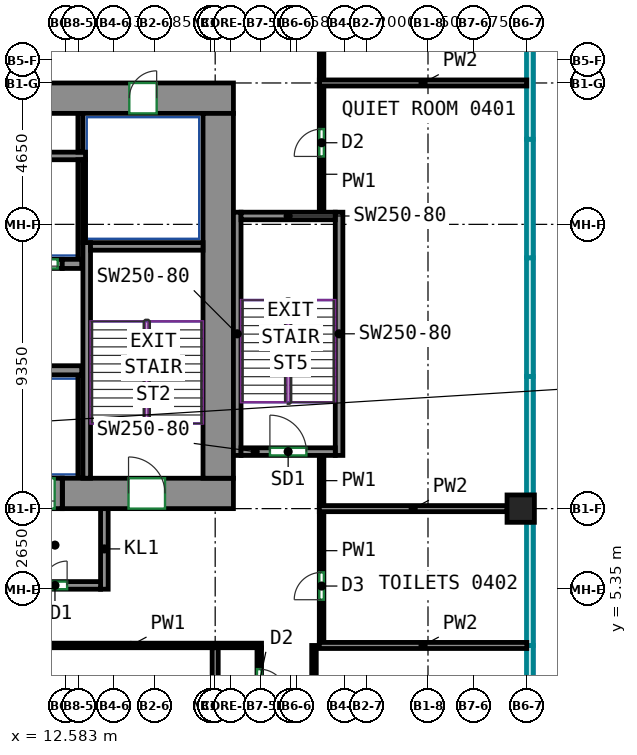
"""IFC4 building model, lengths in metres.
Left out: names, types, materials, properties, quantities, classifications, styles, units other than length and angle.
Written with IfcOpenShell. Run it as: python <this file> out.ifc"""

import sys

from ifc_helpers import new_model, si_unit, direction, frame, frame_2d, origin, origin_2d, place, context, subcontext, project, spatial, rectangle, extrude, source, transform, mapped, element, fill, save


model = new_model("IFC4")
c1 = context("Model", 3, precision=1e-05, world=origin(), true_north=direction((0.0, 1.0)))
c2 = subcontext(c1, "Body", "Model", "MODEL_VIEW")
j1 = project(units=[si_unit("LENGTHUNIT", "METRE"), si_unit("PLANEANGLEUNIT", "RADIAN")], contexts=[c1])
p1 = place(None, origin())
s1 = spatial("IfcSite", under=j1, at=p1, CompositionType="ELEMENT")
p2 = place(p1, origin())
s2 = spatial("IfcBuilding", under=s1, at=p2, CompositionType="ELEMENT")
p3 = place(p2, frame((0.0, 0.0, 22.5)))
s3 = spatial("IfcBuildingStorey", under=s2, at=p3, CompositionType="ELEMENT", Elevation=22.5)
m1 = source(origin(), c2, "Body", "SweptSolid", [
    extrude(rectangle(XDim=0.9, YDim=0.9, at=origin_2d()), origin(), (0.0, 0.0, 1.0), 4.22),
])
p4 = place(p3, frame((27.55, 8.0, 0.0), z_axis=(0.0, 0.0, 1.0), x_axis=(1.0, 0.0, 0.0)))
e1 = element("IfcColumn", 1, at=p4, inside=s3, PredefinedType="COLUMN", context=c2, shape_type="MappedRepresentation", body=[
    mapped(m1, transform((0.0, 0.0, 0.0))),
])
m2 = source(origin(), c2, "Body", "SweptSolid", [
    extrude(rectangle(XDim=5.63, YDim=1.0, at=frame_2d((2.815, 0.0))), origin(), (0.0, 0.0, 1.0), 4.22),
])
p5 = place(p3, frame((12.47, 8.5, 0.0), z_axis=(0.0, 0.0, 1.0), x_axis=(1.0, 0.0, 0.0)))
e2 = element("IfcWall", 2, at=p5, inside=s3, PredefinedType="SHEAR", context=c2, shape_type="MappedRepresentation", body=[
    mapped(m2, transform((0.0, 0.0, 0.0))),
])
p6 = place(p5, frame((2.18, 0.0, 0.0)))
e3 = element("IfcOpeningElement", 3, at=p6, cuts=e2, PredefinedType="OPENING", context=c2, shape_type="SweptSolid", body=[
    extrude(rectangle(XDim=1.2, YDim=2.1, at=frame_2d((0.6, 1.05))), frame((0.0, 0.51, 0.0), z_axis=(0.0, -1.0, 0.0), x_axis=(1.0, 0.0, 0.0)), (0.0, 0.0, 1.0), 1.02),
])
m3 = source(origin(), c2, "Body", "SweptSolid", [
    extrude(rectangle(XDim=34.1, YDim=1.0, at=frame_2d((17.05, 0.0))), origin(), (0.0, 0.0, 1.0), 4.22),
])
p7 = place(p3, frame((-16.0, 21.5, 0.0), z_axis=(0.0, 0.0, 1.0), x_axis=(1.0, 0.0, 0.0)))
e4 = element("IfcWall", 4, at=p7, inside=s3, PredefinedType="SHEAR", context=c2, shape_type="MappedRepresentation", body=[
    mapped(m3, transform((0.0, 0.0, 0.0))),
])
p8 = place(p7, frame((6.831, 0.0, 0.0)))
e5 = element("IfcOpeningElement", 5, at=p8, cuts=e4, PredefinedType="OPENING", context=c2, shape_type="SweptSolid", body=[
    extrude(rectangle(XDim=0.9, YDim=2.1, at=frame_2d((0.45, 1.05))), frame((0.0, 0.51, 0.0), z_axis=(0.0, -1.0, 0.0), x_axis=(1.0, 0.0, 0.0)), (0.0, 0.0, 1.0), 1.02),
])
p9 = place(p7, frame((12.138, 0.0, 0.0)))
e6 = element("IfcOpeningElement", 6, at=p9, cuts=e4, PredefinedType="OPENING", context=c2, shape_type="SweptSolid", body=[
    extrude(rectangle(XDim=0.9, YDim=2.1, at=frame_2d((0.45, 1.05))), frame((0.0, 0.51, 0.0), z_axis=(0.0, -1.0, 0.0), x_axis=(1.0, 0.0, 0.0)), (0.0, 0.0, 1.0), 1.02),
])
p10 = place(p7, frame((17.565, 0.0, 0.0)))
e7 = element("IfcOpeningElement", 7, at=p10, cuts=e4, PredefinedType="OPENING", context=c2, shape_type="SweptSolid", body=[
    extrude(rectangle(XDim=0.9, YDim=2.1, at=frame_2d((0.45, 1.05))), frame((0.0, 0.51, 0.0), z_axis=(0.0, -1.0, 0.0), x_axis=(1.0, 0.0, 0.0)), (0.0, 0.0, 1.0), 1.02),
])
p11 = place(p7, frame((21.786, 0.0, 0.0)))
e8 = element("IfcOpeningElement", 8, at=p11, cuts=e4, PredefinedType="OPENING", context=c2, shape_type="SweptSolid", body=[
    extrude(rectangle(XDim=0.9, YDim=2.1, at=frame_2d((0.45, 1.05))), frame((0.0, 0.51, 0.0), z_axis=(0.0, -1.0, 0.0), x_axis=(1.0, 0.0, 0.0)), (0.0, 0.0, 1.0), 1.02),
])
p12 = place(p7, frame((26.127, 0.0, 0.0)))
e9 = element("IfcOpeningElement", 9, at=p12, cuts=e4, PredefinedType="OPENING", context=c2, shape_type="SweptSolid", body=[
    extrude(rectangle(XDim=0.9, YDim=2.1, at=frame_2d((0.45, 1.05))), frame((0.0, 0.51, 0.0), z_axis=(0.0, -1.0, 0.0), x_axis=(1.0, 0.0, 0.0)), (0.0, 0.0, 1.0), 1.02),
])
p13 = place(p7, frame((2.525, 0.0, 0.0)))
e10 = element("IfcOpeningElement", 10, at=p13, cuts=e4, PredefinedType="OPENING", context=c2, shape_type="SweptSolid", body=[
    extrude(rectangle(XDim=0.9, YDim=2.1, at=frame_2d((0.45, 1.05))), frame((0.0, 0.51, 0.0), z_axis=(0.0, -1.0, 0.0), x_axis=(1.0, 0.0, 0.0)), (0.0, 0.0, 1.0), 1.02),
])
p14 = place(p7, frame((30.675, 0.0, 0.0)))
e11 = element("IfcOpeningElement", 11, at=p14, cuts=e4, PredefinedType="OPENING", context=c2, shape_type="SweptSolid", body=[
    extrude(rectangle(XDim=0.9, YDim=2.1, at=frame_2d((0.45, 1.05))), frame((0.0, 0.51, 0.0), z_axis=(0.0, -1.0, 0.0), x_axis=(1.0, 0.0, 0.0)), (0.0, 0.0, 1.0), 1.02),
])
m4 = source(origin(), c2, "Body", "SweptSolid", [
    extrude(rectangle(XDim=12.0, YDim=1.0, at=frame_2d((6.0, 0.0))), origin(), (0.0, 0.0, 1.0), 4.22),
])
p15 = place(p3, frame((17.6, 9.0, 0.0), z_axis=(0.0, 0.0, 1.0), x_axis=(0.0, 1.0, 0.0)))
e12 = element("IfcWall", 12, at=p15, inside=s3, PredefinedType="SHEAR", context=c2, shape_type="MappedRepresentation", body=[
    mapped(m4, transform((0.0, 0.0, 0.0))),
])
m5 = source(origin(), c2, "Body", "SweptSolid", [
    extrude(rectangle(XDim=7.75, YDim=0.25, at=frame_2d((3.875, 0.0))), origin(), (0.0, 0.0, 1.0), 4.22),
])
p16 = place(p3, frame((13.275, 9.0, 0.0), z_axis=(0.0, 0.0, 1.0), x_axis=(0.0, 1.0, 0.0)))
e13 = element("IfcWall", 13, at=p16, inside=s3, PredefinedType="SHEAR", context=c2, shape_type="MappedRepresentation", body=[
    mapped(m5, transform((0.0, 0.0, 0.0))),
])
m6 = source(origin(), c2, "Body", "SweptSolid", [
    extrude(rectangle(XDim=3.7, YDim=0.25, at=frame_2d((1.85, 0.0))), origin(), (0.0, 0.0, 1.0), 4.22),
])
p17 = place(p3, frame((13.4, 16.625, 0.0), z_axis=(0.0, 0.0, 1.0), x_axis=(1.0, 0.0, 0.0)))
e14 = element("IfcWall", 14, at=p17, inside=s3, PredefinedType="SHEAR", context=c2, shape_type="MappedRepresentation", body=[
    mapped(m6, transform((0.0, 0.0, 0.0))),
])
m7 = source(origin(), c2, "Body", "SweptSolid", [
    extrude(rectangle(XDim=8.0, YDim=0.25, at=frame_2d((4.0, 0.0))), origin(), (0.0, 0.0, 1.0), 4.22),
])
for number, where, z_axis, x_axis in (
    (15, (18.225, 9.75, 0.0), (0.0, 0.0, 1.0), (0.0, 1.0, 0.0)),
    (16, (21.575, 9.75, 0.0), (0.0, 0.0, 1.0), (0.0, 1.0, 0.0)),
):
    element("IfcWall", number, at=place(p3, frame(where, z_axis=z_axis, x_axis=x_axis)), inside=s3, PredefinedType="SHEAR", context=c2, shape_type="MappedRepresentation", body=[
        mapped(m7, transform((0.0, 0.0, 0.0))),
    ])
m8 = source(origin(), c2, "Body", "SweptSolid", [
    extrude(rectangle(XDim=3.1, YDim=0.25, at=frame_2d((1.55, 0.0))), origin(), (0.0, 0.0, 1.0), 4.22),
])
p18 = place(p3, frame((18.35, 9.875, 0.0), z_axis=(0.0, 0.0, 1.0), x_axis=(1.0, 0.0, 0.0)))
e17 = element("IfcWall", 17, at=p18, inside=s3, PredefinedType="SHEAR", context=c2, shape_type="MappedRepresentation", body=[
    mapped(m8, transform((0.0, 0.0, 0.0))),
])
p19 = place(p18, frame((0.95, 0.0, 0.0)))
e18 = element("IfcOpeningElement", 18, at=p19, cuts=e17, PredefinedType="OPENING", context=c2, shape_type="SweptSolid", body=[
    extrude(rectangle(XDim=1.2, YDim=2.1, at=frame_2d((0.6, 1.05))), frame((0.0, 0.135, 0.0), z_axis=(0.0, -1.0, 0.0), x_axis=(1.0, 0.0, 0.0)), (0.0, 0.0, 1.0), 0.27),
])
p20 = place(p3, frame((18.35, 17.625, 0.0), z_axis=(0.0, 0.0, 1.0), x_axis=(1.0, 0.0, 0.0)))
e19 = element("IfcWall", 19, at=p20, inside=s3, PredefinedType="SHEAR", context=c2, shape_type="MappedRepresentation", body=[
    mapped(m8, transform((0.0, 0.0, 0.0))),
])
m9 = source(origin(), c2, "Body", "SweptSolid", [
    extrude(rectangle(XDim=2.82, YDim=0.3, at=frame_2d((1.41, 0.0))), origin(), (0.0, 0.0, 1.0), 4.22),
])
p21 = place(p3, frame((10.29, 12.55, 0.0), z_axis=(0.0, 0.0, 1.0), x_axis=(1.0, 0.0, 0.0)))
e20 = element("IfcWall", 20, at=p21, inside=s3, PredefinedType="SHEAR", context=c2, shape_type="MappedRepresentation", body=[
    mapped(m9, transform((0.0, 0.0, 0.0))),
])
m10 = source(origin(), c2, "Body", "SweptSolid", [
    extrude(rectangle(XDim=0.64, YDim=0.3, at=frame_2d((0.32, 0.0))), origin(), (0.0, 0.0, 1.0), 4.22),
])
p22 = place(p3, frame((12.47, 16.05, 0.0), z_axis=(0.0, 0.0, 1.0), x_axis=(1.0, 0.0, 0.0)))
e21 = element("IfcWall", 21, at=p22, inside=s3, PredefinedType="SHEAR", context=c2, shape_type="MappedRepresentation", body=[
    mapped(m10, transform((0.0, 0.0, 0.0))),
])
m11 = source(origin(), c2, "Body", "SweptSolid", [
    extrude(rectangle(XDim=1.4, YDim=1.0, at=frame_2d((0.7, 0.0))), origin(), (0.0, 0.0, 1.0), 0.27),
])
p23 = place(p3, frame((11.07, 8.5, 3.95), z_axis=(0.0, 0.0, 1.0), x_axis=(1.0, 0.0, 0.0)))
e22 = element("IfcWall", 22, at=p23, inside=s3, PredefinedType="SHEAR", context=c2, shape_type="MappedRepresentation", body=[
    mapped(m11, transform((0.0, 0.0, 0.0))),
])
m12 = source(origin(), c2, "Body", "SweptSolid", [
    extrude(rectangle(XDim=1.4, YDim=0.3, at=frame_2d((0.7, 0.0))), origin(), (0.0, 0.0, 1.0), 4.22),
])
p24 = place(p3, frame((11.07, 16.05, 0.0), z_axis=(0.0, 0.0, 1.0), x_axis=(1.0, 0.0, 0.0)))
e23 = element("IfcWall", 23, at=p24, inside=s3, PredefinedType="PARTITIONING", context=c2, shape_type="MappedRepresentation", body=[
    mapped(m12, transform((0.0, 0.0, 0.0))),
])
p25 = place(p24, frame((0.15, 0.0, 0.0)))
e24 = element("IfcOpeningElement", 24, at=p25, cuts=e23, PredefinedType="OPENING", context=c2, shape_type="SweptSolid", body=[
    extrude(rectangle(XDim=1.1, YDim=2.1, at=frame_2d((0.55, 1.05))), frame((0.0, 0.16, 0.0), z_axis=(0.0, -1.0, 0.0), x_axis=(1.0, 0.0, 0.0)), (0.0, 0.0, 1.0), 0.32),
])
m13 = source(origin(), c2, "Body", "SweptSolid", [
    extrude(rectangle(XDim=2.65, YDim=0.25, at=frame_2d((1.325, 0.0))), origin(), (0.0, 0.0, 1.0), 4.22),
])
p26 = place(p3, frame((13.855, 5.35, 0.0), z_axis=(0.0, 0.0, 1.0), x_axis=(0.0, 1.0, 0.0)))
e25 = element("IfcWall", 25, at=p26, inside=s3, PredefinedType="PARTITIONING", context=c2, shape_type="MappedRepresentation", body=[
    mapped(m13, transform((0.0, 0.0, 0.0))),
])
m14 = source(origin(), c2, "Body", "SweptSolid", [
    extrude(rectangle(XDim=3.0, YDim=0.25, at=frame_2d((1.5, 0.0))), origin(), (0.0, 0.0, 1.0), 4.22),
])
p27 = place(p3, frame((10.73, 5.475, 0.0), z_axis=(0.0, 0.0, 1.0), x_axis=(1.0, 0.0, 0.0)))
e26 = element("IfcWall", 26, at=p27, inside=s3, PredefinedType="PARTITIONING", context=c2, shape_type="MappedRepresentation", body=[
    mapped(m14, transform((0.0, 0.0, 0.0))),
])
p28 = place(p27, frame((1.1, 0.0, 0.0)))
e27 = element("IfcOpeningElement", 27, at=p28, cuts=e26, PredefinedType="OPENING", context=c2, shape_type="SweptSolid", body=[
    extrude(rectangle(XDim=0.8, YDim=2.0, at=frame_2d((0.4, 1.0))), frame((0.0, 0.135, 0.0), z_axis=(0.0, -1.0, 0.0), x_axis=(1.0, 0.0, 0.0)), (0.0, 0.0, 1.0), 0.27),
])
m15 = source(origin(), c2, "Body", "SweptSolid", [
    extrude(rectangle(XDim=24.37, YDim=0.25, at=frame_2d((12.185, 0.0))), origin(), (0.0, 0.0, 1.0), 4.22),
])
p29 = place(p3, frame((-11.135, 19.6, 0.0), z_axis=(0.0, 0.0, 1.0), x_axis=(1.0, 0.0, 0.0)))
e28 = element("IfcWall", 28, at=p29, inside=s3, PredefinedType="PARTITIONING", context=c2, shape_type="MappedRepresentation", body=[
    mapped(m15, transform((0.0, 0.0, 0.0))),
])
m16 = source(origin(), c2, "Body", "SweptSolid", [
    extrude(rectangle(XDim=3.275, YDim=0.165, at=frame_2d((1.638, 0.0))), origin(), (0.0, 0.0, 1.0), 4.22),
])
p30 = place(p3, frame((13.067, 16.2, 0.0), z_axis=(0.0, 0.0, 1.0), x_axis=(0.0, 1.0, 0.0)))
e29 = element("IfcWall", 29, at=p30, inside=s3, PredefinedType="PARTITIONING", context=c2, shape_type="MappedRepresentation", body=[
    mapped(m16, transform((0.0, 0.0, 0.0))),
])
m17 = source(origin(), c2, "Body", "SweptSolid", [
    extrude(rectangle(XDim=1.275, YDim=0.165, at=frame_2d((0.637, 0.0))), origin(), (0.0, 0.0, 1.0), 4.22),
])
p31 = place(p3, frame((13.067, 19.725, 0.0), z_axis=(0.0, 0.0, 1.0), x_axis=(0.0, 1.0, 0.0)))
e30 = element("IfcWall", 30, at=p31, inside=s3, PredefinedType="PARTITIONING", context=c2, shape_type="MappedRepresentation", body=[
    mapped(m17, transform((0.0, 0.0, 0.0))),
])
m18 = source(origin(), c2, "Body", "SweptSolid", [
    extrude(rectangle(XDim=2.725, YDim=0.085, at=frame_2d((1.363, 0.0))), origin(), (0.0, 0.0, 1.0), 4.22),
])
p32 = place(p3, frame((13.192, 16.75, 0.0), z_axis=(0.0, 0.0, 1.0), x_axis=(0.0, 1.0, 0.0)))
e31 = element("IfcWall", 31, at=p32, inside=s3, PredefinedType="PARTITIONING", context=c2, shape_type="MappedRepresentation", body=[
    mapped(m18, transform((0.0, 0.0, 0.0))),
])
m19 = source(origin(), c2, "Body", "SweptSolid", [
    extrude(rectangle(XDim=3.4, YDim=0.165, at=frame_2d((1.7, 0.0))), origin(), (0.0, 0.0, 1.0), 4.22),
])
p33 = place(p3, frame((13.067, 9.0, 0.0), z_axis=(0.0, 0.0, 1.0), x_axis=(0.0, 1.0, 0.0)))
e32 = element("IfcWall", 32, at=p33, inside=s3, PredefinedType="PARTITIONING", context=c2, shape_type="MappedRepresentation", body=[
    mapped(m19, transform((0.0, 0.0, 0.0))),
])
m20 = source(origin(), c2, "Body", "SweptSolid", [
    extrude(rectangle(XDim=1.4, YDim=1.0, at=frame_2d((0.7, 0.0))), origin(), (0.0, 0.0, 1.0), 2.7),
])
p34 = place(p3, frame((11.07, 8.5, 0.0), z_axis=(0.0, 0.0, 1.0), x_axis=(1.0, 0.0, 0.0)))
e33 = element("IfcWall", 33, at=p34, inside=s3, PredefinedType="PARTITIONING", context=c2, shape_type="MappedRepresentation", body=[
    mapped(m20, transform((0.0, 0.0, 0.0))),
])
p35 = place(p34, frame((0.25, 0.0, 0.0)))
e34 = element("IfcOpeningElement", 34, at=p35, cuts=e33, PredefinedType="OPENING", context=c2, shape_type="SweptSolid", body=[
    extrude(rectangle(XDim=0.9, YDim=2.1, at=frame_2d((0.45, 1.05))), frame((0.0, 0.51, 0.0), z_axis=(0.0, -1.0, 0.0), x_axis=(1.0, 0.0, 0.0)), (0.0, 0.0, 1.0), 1.02),
])
p36 = place(p3, frame((10.425, 3.5, 0.0), z_axis=(0.0, 0.0, 1.0), x_axis=(1.0, 0.0, 0.0)))
e35 = element("IfcWall", 35, at=p36, inside=s3, PredefinedType="PARTITIONING", context=c2, shape_type="SweptSolid", body=[
    extrude(rectangle(XDim=8.6, YDim=0.15, at=frame_2d((4.3, 0.0))), origin(), (0.0, 0.0, 1.0), 4.22),
])
p37 = place(p3, frame((18.95, 3.425, 0.0), z_axis=(0.0, 0.0, 1.0), x_axis=(0.0, -1.0, 0.0)))
e36 = element("IfcWall", 36, at=p37, inside=s3, PredefinedType="PARTITIONING", context=c2, shape_type="SweptSolid", body=[
    extrude(rectangle(XDim=11.175, YDim=0.15, at=frame_2d((5.587, 0.0))), origin(), (0.0, 0.0, 1.0), 4.22),
])
p38 = place(p37, frame((0.704, 0.0, 0.0)))
e37 = element("IfcOpeningElement", 37, at=p38, cuts=e36, PredefinedType="OPENING", context=c2, shape_type="SweptSolid", body=[
    extrude(rectangle(XDim=0.9, YDim=2.1, at=frame_2d((0.45, 1.05))), frame((0.0, 0.085, 0.0), z_axis=(0.0, -1.0, 0.0), x_axis=(1.0, 0.0, 0.0)), (0.0, 0.0, 1.0), 0.17),
])
p39 = place(p3, frame((20.75, -0.91, 0.0), z_axis=(0.0, 0.0, 1.0), x_axis=(0.0, 1.0, 0.0)))
e38 = element("IfcWall", 38, at=p39, inside=s3, PredefinedType="PARTITIONING", context=c2, shape_type="SweptSolid", body=[
    extrude(rectangle(XDim=4.41, YDim=0.15, at=frame_2d((2.205, 0.0))), origin(), (0.0, 0.0, 1.0), 4.22),
])
p40 = place(p39, frame((0.401, 0.0, 0.0)))
e39 = element("IfcOpeningElement", 39, at=p40, cuts=e38, PredefinedType="OPENING", context=c2, shape_type="SweptSolid", body=[
    extrude(rectangle(XDim=0.9, YDim=2.1, at=frame_2d((0.45, 1.05))), frame((0.0, 0.085, 0.0), z_axis=(0.0, -1.0, 0.0), x_axis=(1.0, 0.0, 0.0)), (0.0, 0.0, 1.0), 0.17),
])
p41 = place(p3, frame((21.0, 3.6, 0.0), z_axis=(0.0, 0.0, 1.0), x_axis=(0.0, 1.0, 0.0)))
e40 = element("IfcWall", 40, at=p41, inside=s3, PredefinedType="PARTITIONING", context=c2, shape_type="SweptSolid", body=[
    extrude(rectangle(XDim=4.31, YDim=0.15, at=frame_2d((2.155, 0.0))), origin(), (0.0, 0.0, 1.0), 4.22),
])
p42 = place(p41, frame((1.404, 0.0, 0.0)))
e41 = element("IfcOpeningElement", 41, at=p42, cuts=e40, PredefinedType="OPENING", context=c2, shape_type="SweptSolid", body=[
    extrude(rectangle(XDim=0.9, YDim=2.1, at=frame_2d((0.45, 1.05))), frame((0.0, 0.085, 0.0), z_axis=(0.0, -1.0, 0.0), x_axis=(1.0, 0.0, 0.0)), (0.0, 0.0, 1.0), 0.17),
])
p43 = place(p3, frame((21.0, 17.75, 0.0), z_axis=(0.0, 0.0, 1.0), x_axis=(0.0, 1.0, 0.0)))
e42 = element("IfcWall", 42, at=p43, inside=s3, PredefinedType="PARTITIONING", context=c2, shape_type="SweptSolid", body=[
    extrude(rectangle(XDim=4.16, YDim=0.15, at=frame_2d((2.08, 0.0))), origin(), (0.0, 0.0, 1.0), 4.22),
])
p44 = place(p43, frame((1.834, 0.0, 0.0)))
e43 = element("IfcOpeningElement", 43, at=p44, cuts=e42, PredefinedType="OPENING", context=c2, shape_type="SweptSolid", body=[
    extrude(rectangle(XDim=0.9, YDim=2.1, at=frame_2d((0.45, 1.05))), frame((0.0, 0.085, 0.0), z_axis=(0.0, -1.0, 0.0), x_axis=(1.0, 0.0, 0.0)), (0.0, 0.0, 1.0), 0.17),
])
p45 = place(p3, frame((21.0, 8.09, 0.0), z_axis=(0.0, 0.0, 1.0), x_axis=(0.0, 1.0, 0.0)))
e44 = element("IfcWall", 44, at=p45, inside=s3, PredefinedType="PARTITIONING", context=c2, shape_type="SweptSolid", body=[
    extrude(rectangle(XDim=1.66, YDim=0.15, at=frame_2d((0.83, 0.0))), origin(), (0.0, 0.0, 1.0), 4.22),
])
p46 = place(p3, frame((21.0, 22.09, 0.0), z_axis=(0.0, 0.0, 1.0), x_axis=(0.0, 1.0, 0.0)))
e45 = element("IfcWall", 45, at=p46, inside=s3, PredefinedType="PARTITIONING", context=c2, shape_type="SweptSolid", body=[
    extrude(rectangle(XDim=2.335, YDim=0.15, at=frame_2d((1.167, 0.0))), origin(), (0.0, 0.0, 1.0), 4.22),
])
p47 = place(p3, frame((17.5, -0.35, 0.0), z_axis=(0.0, 0.0, 1.0), x_axis=(0.0, 1.0, 0.0)))
e46 = element("IfcWall", 46, at=p47, inside=s3, PredefinedType="PARTITIONING", context=c2, shape_type="SweptSolid", body=[
    extrude(rectangle(XDim=3.774, YDim=0.2, at=frame_2d((1.887, 0.0))), origin(), (0.0, 0.0, 1.0), 4.22),
])
p48 = place(p3, frame((27.75, 3.5, 0.0), z_axis=(0.0, 0.0, 1.0), x_axis=(-1.0, 0.0, 0.0)))
e47 = element("IfcWall", 47, at=p48, inside=s3, PredefinedType="PARTITIONING", context=c2, shape_type="SweptSolid", body=[
    extrude(rectangle(XDim=6.824, YDim=0.2, at=frame_2d((3.412, 0.0))), origin(), (0.0, 0.0, 1.0), 4.22),
])
p49 = place(p3, frame((20.926, 8.0, 0.0), z_axis=(0.0, 0.0, 1.0), x_axis=(1.0, 0.0, 0.0)))
e48 = element("IfcWall", 48, at=p49, inside=s3, PredefinedType="PARTITIONING", context=c2, shape_type="SweptSolid", body=[
    extrude(rectangle(XDim=6.174, YDim=0.2, at=frame_2d((3.087, 0.0))), origin(), (0.0, 0.0, 1.0), 4.22),
])
p50 = place(p3, frame((20.926, 22.0, 0.0), z_axis=(0.0, 0.0, 1.0), x_axis=(1.0, 0.0, 0.0)))
e49 = element("IfcWall", 49, at=p50, inside=s3, PredefinedType="PARTITIONING", context=c2, shape_type="SweptSolid", body=[
    extrude(rectangle(XDim=6.824, YDim=0.2, at=frame_2d((3.412, 0.0))), origin(), (0.0, 0.0, 1.0), 4.22),
])
p51 = place(p28, origin())
e50 = element("IfcDoor", 50, at=p51, inside=s3, OperationType="SINGLE_SWING_RIGHT", PredefinedType="DOOR", context=c2, shape_type="SweptSolid", body=[
    extrude(rectangle(XDim=0.8, YDim=2.0, at=frame_2d((0.4, 1.0))), frame((0.0, 0.025, 0.0), z_axis=(0.0, -1.0, 0.0), x_axis=(1.0, 0.0, 0.0)), (0.0, 0.0, 1.0), 0.05),
])
fill(e27, e50)
p52 = place(p35, origin())
e51 = element("IfcDoor", 51, at=p52, inside=s3, OperationType="SLIDING_TO_LEFT", PredefinedType="DOOR", context=c2, shape_type="SweptSolid", body=[
    extrude(rectangle(XDim=0.9, YDim=2.1, at=frame_2d((0.45, 1.05))), frame((0.0, 0.405, 0.0), z_axis=(0.0, -1.0, 0.0), x_axis=(1.0, 0.0, 0.0)), (0.0, 0.0, 1.0), 0.05),
])
fill(e34, e51)
p53 = place(p25, origin())
e52 = element("IfcDoor", 52, at=p53, inside=s3, OperationType="DOUBLE_DOOR_SLIDING", PredefinedType="DOOR", context=c2, shape_type="SweptSolid", body=[
    extrude(rectangle(XDim=1.1, YDim=2.1, at=frame_2d((0.55, 1.05))), frame((0.0, 0.025, 0.0), z_axis=(0.0, -1.0, 0.0), x_axis=(1.0, 0.0, 0.0)), (0.0, 0.0, 1.0), 0.05),
])
fill(e24, e52)
p54 = place(p14, origin())
e53 = element("IfcDoor", 53, at=p54, inside=s3, OperationType="SINGLE_SWING_RIGHT", PredefinedType="DOOR", context=c2, shape_type="SweptSolid", body=[
    extrude(rectangle(XDim=0.9, YDim=2.1, at=frame_2d((0.45, 1.05))), frame((0.0, -0.355, 0.0), z_axis=(0.0, -1.0, 0.0), x_axis=(1.0, 0.0, 0.0)), (0.0, 0.0, 1.0), 0.05),
])
fill(e11, e53)
p55 = place(p6, origin())
e54 = element("IfcDoor", 54, at=p55, inside=s3, OperationType="DOUBLE_DOOR_SINGLE_SWING", PredefinedType="DOOR", context=c2, shape_type="SweptSolid", body=[
    extrude(rectangle(XDim=1.2, YDim=2.1, at=frame_2d((0.6, 1.05))), frame((0.0, 0.405, 0.0), z_axis=(0.0, -1.0, 0.0), x_axis=(1.0, 0.0, 0.0)), (0.0, 0.0, 1.0), 0.05),
])
fill(e3, e54)
p56 = place(p19, origin())
e55 = element("IfcDoor", 55, at=p56, inside=s3, OperationType="DOUBLE_DOOR_SINGLE_SWING", PredefinedType="DOOR", context=c2, shape_type="SweptSolid", body=[
    extrude(rectangle(XDim=1.2, YDim=2.1, at=frame_2d((0.6, 1.05))), frame((0.0, 0.025, 0.0), z_axis=(0.0, -1.0, 0.0), x_axis=(1.0, 0.0, 0.0)), (0.0, 0.0, 1.0), 0.05),
])
fill(e18, e55)
p57 = place(p38, origin())
e56 = element("IfcDoor", 56, at=p57, inside=s3, OperationType="SINGLE_SWING_RIGHT", PredefinedType="DOOR", context=c2, shape_type="SweptSolid", body=[
    extrude(rectangle(XDim=0.9, YDim=2.1, at=frame_2d((0.45, 1.05))), frame((0.0, 0.025, 0.0), z_axis=(0.0, -1.0, 0.0), x_axis=(1.0, 0.0, 0.0)), (0.0, 0.0, 1.0), 0.05),
])
fill(e37, e56)
p58 = place(p42, origin())
e57 = element("IfcDoor", 57, at=p58, inside=s3, OperationType="SINGLE_SWING_LEFT", PredefinedType="DOOR", context=c2, shape_type="SweptSolid", body=[
    extrude(rectangle(XDim=0.9, YDim=2.1, at=frame_2d((0.45, 1.05))), frame((0.0, 0.025, 0.0), z_axis=(0.0, -1.0, 0.0), x_axis=(1.0, 0.0, 0.0)), (0.0, 0.0, 1.0), 0.05),
])
fill(e41, e57)
p59 = place(p44, origin())
e58 = element("IfcDoor", 58, at=p59, inside=s3, OperationType="SINGLE_SWING_LEFT", PredefinedType="DOOR", context=c2, shape_type="SweptSolid", body=[
    extrude(rectangle(XDim=0.9, YDim=2.1, at=frame_2d((0.45, 1.05))), frame((0.0, 0.025, 0.0), z_axis=(0.0, -1.0, 0.0), x_axis=(1.0, 0.0, 0.0)), (0.0, 0.0, 1.0), 0.05),
])
fill(e43, e58)
save(model, sys.argv[1])
